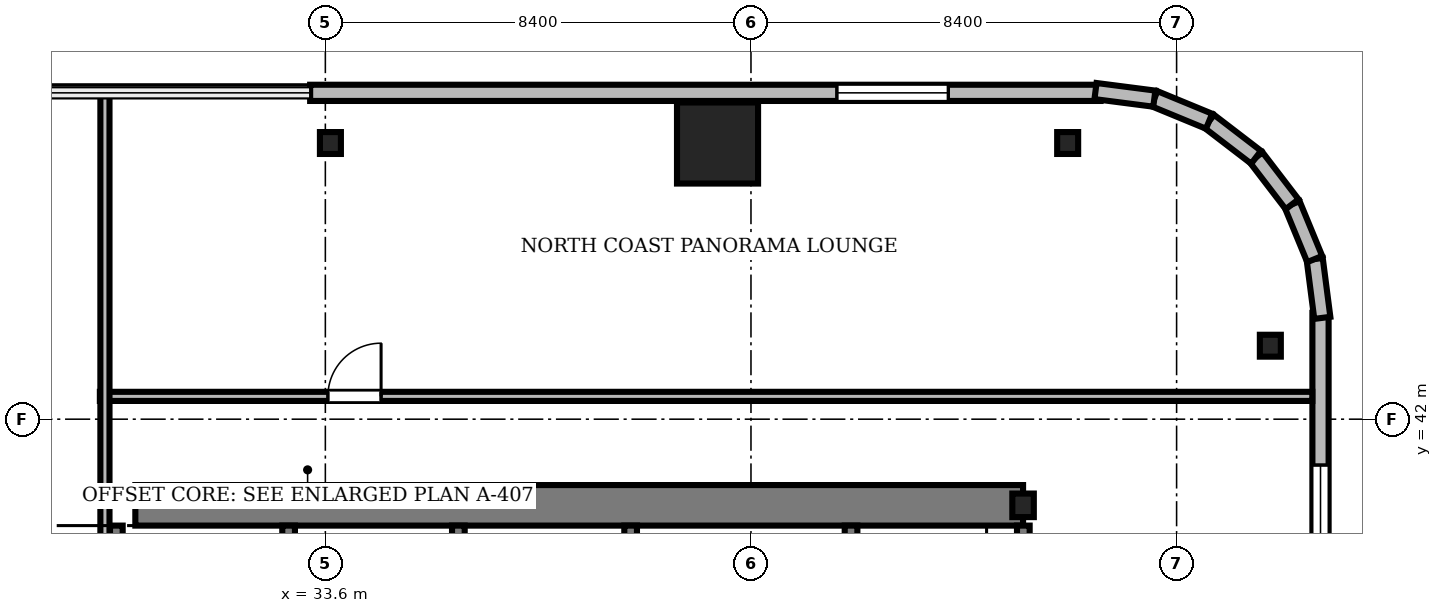
"""IFC4 building model, lengths in metres.
Left out: names, types, materials, properties, quantities, classifications, styles, units other than length and angle.
Written with IfcOpenShell. Run it as: python <this file> out.ifc"""

import sys

from ifc_helpers import new_model, si_unit, direction, frame, frame_2d, origin, origin_2d, place, context, subcontext, project, spatial, rectangle, i_section, extrude, source, transform, mapped, element, fill, save


model = new_model("IFC4")
c1 = context("Model", 3, precision=1e-05, world=origin(), true_north=direction((0.0, 1.0)))
c2 = subcontext(c1, "Body", "Model", "MODEL_VIEW")
j1 = project(units=[si_unit("LENGTHUNIT", "METRE"), si_unit("PLANEANGLEUNIT", "RADIAN")], contexts=[c1])
p1 = place(None, origin())
s1 = spatial("IfcSite", under=j1, at=p1, CompositionType="ELEMENT")
p2 = place(p1, origin())
s2 = spatial("IfcBuilding", under=s1, at=p2, CompositionType="ELEMENT")
p3 = place(p2, frame((0.0, 0.0, 152.0)))
s3 = spatial("IfcBuildingStorey", under=s2, at=p3, CompositionType="ELEMENT", Elevation=152.0)
m1 = source(origin(), c2, "Body", "SweptSolid", [
    extrude(rectangle(XDim=17.52, YDim=0.8, at=frame_2d((8.76, 0.0))), origin(), (0.0, 0.0, 1.0), 3.46),
])
p4 = place(p3, frame((29.85, 40.3, 0.0), z_axis=(0.0, 0.0, 1.0), x_axis=(1.0, 0.0, 0.0)))
e1 = element("IfcWall", 1, at=p4, inside=s3, PredefinedType="SHEAR", context=c2, shape_type="MappedRepresentation", body=[
    mapped(m1, transform((0.0, 0.0, 0.0), scale=1.0)),
])
m2 = source(origin(), c2, "Body", "SweptSolid", [
    extrude(i_section(OverallWidth=0.424, OverallDepth=0.465, WebThickness=0.035, FlangeThickness=0.056, FilletRadius=0.015, at=origin_2d()), origin(), (0.0, 0.0, 1.0), 3.46),
])
p5 = place(p3, frame((47.37, 40.3, 0.0), z_axis=(0.0, 0.0, 1.0), x_axis=(1.0, 0.0, 0.0)))
e2 = element("IfcColumn", 2, at=p5, inside=s3, PredefinedType="COLUMN", context=c2, shape_type="MappedRepresentation", body=[
    mapped(m2, transform((0.0, 0.0, 0.0), scale=1.0)),
])
m3 = source(origin(), c2, "Body", "SweptSolid", [
    extrude(rectangle(XDim=1.6, YDim=1.6, at=origin_2d()), origin(), (0.0, 0.0, 1.0), 3.46),
])
p6 = place(p3, frame((41.34, 47.45, 0.0), z_axis=(0.0, 0.0, 1.0), x_axis=(1.0, 0.0, 0.0)))
e3 = element("IfcColumn", 3, at=p6, inside=s3, PredefinedType="COLUMN", context=c2, shape_type="MappedRepresentation", body=[
    mapped(m3, transform((0.0, 0.0, 0.0), scale=1.0)),
])
m4 = source(origin(), c2, "Body", "SweptSolid", [
    extrude(i_section(OverallWidth=0.414, OverallDepth=0.432, WebThickness=0.026, FlangeThickness=0.04, FilletRadius=0.015, at=origin_2d()), origin(), (0.0, 0.0, 1.0), 3.46),
])
for number, where, z_axis, x_axis in (
    (4, (52.25, 43.45, 0.0), (0.0, 0.0, 1.0), (1.0, 0.0, 0.0)),
    (5, (48.25, 47.45, 0.0), (0.0, 0.0, 1.0), (1.0, 0.0, 0.0)),
    (6, (33.7, 47.45, 0.0), (0.0, 0.0, 1.0), (1.0, 0.0, 0.0)),
):
    element("IfcColumn", number, at=place(p3, frame(where, z_axis=z_axis, x_axis=x_axis)), inside=s3, PredefinedType="COLUMN", context=c2, shape_type="MappedRepresentation", body=[
        mapped(m4, transform((0.0, 0.0, 0.0), scale=1.0)),
    ])
m5 = source(origin(), c2, "Body", "SweptSolid", [
    extrude(rectangle(XDim=15.6, YDim=0.32, at=frame_2d((7.8, 0.0))), origin(), (0.0, 0.0, 1.0), 3.46),
])
p7 = place(p3, frame((48.9, 48.44, 0.0), z_axis=(0.0, 0.0, 1.0), x_axis=(-1.0, 0.0, 0.0)))
e7 = element("IfcWall", 7, at=p7, inside=s3, PredefinedType="SOLIDWALL", context=c2, shape_type="MappedRepresentation", body=[
    mapped(m5, transform((0.0, 0.0, 0.0), scale=1.0)),
])
m6 = source(origin(), c2, "Body", "SweptSolid", [
    extrude(rectangle(XDim=2.2, YDim=2.4, at=frame_2d((1.1, 1.2))), frame((0.0, 0.17, 0.0), z_axis=(0.0, -1.0, 0.0), x_axis=(1.0, 0.0, 0.0)), (0.0, 0.0, 1.0), 0.34),
])
p8 = place(p7, frame((3.005, 0.0, 0.72)))
e8 = element("IfcOpeningElement", 8, at=p8, cuts=e7, PredefinedType="OPENING", context=c2, shape_type="MappedRepresentation", body=[
    mapped(m6, transform((0.0, 0.0, 0.0), scale=1.0)),
])
m7 = source(origin(), c2, "Body", "SweptSolid", [
    extrude(rectangle(XDim=15.6, YDim=0.32, at=frame_2d((7.8, 0.0))), origin(), (0.0, 0.0, 1.0), 3.46),
])
p9 = place(p3, frame((53.24, 28.5, 0.0), z_axis=(0.0, 0.0, 1.0), x_axis=(0.0, 1.0, 0.0)))
e9 = element("IfcWall", 9, at=p9, inside=s3, PredefinedType="SOLIDWALL", context=c2, shape_type="MappedRepresentation", body=[
    mapped(m7, transform((0.0, 0.0, 0.0), scale=1.0)),
])
p10 = place(p9, frame((10.395, 0.0, 0.72)))
e10 = element("IfcOpeningElement", 10, at=p10, cuts=e9, PredefinedType="OPENING", context=c2, shape_type="MappedRepresentation", body=[
    mapped(m6, transform((0.0, 0.0, 0.0), scale=1.0)),
])
m8 = source(origin(), c2, "Body", "SweptSolid", [
    extrude(rectangle(XDim=1.17, YDim=0.32, at=frame_2d((0.585, 0.0))), origin(), (0.0, 0.0, 1.0), 3.46),
])
p11 = place(p3, frame((53.276, 44.0, 0.0), z_axis=(0.0, 0.0, 1.0), x_axis=(-0.128295670475, 0.991735963317, 0.0)))
e11 = element("IfcWall", 11, at=p11, inside=s3, PredefinedType="SOLIDWALL", context=c2, shape_type="MappedRepresentation", body=[
    mapped(m8, transform((0.0, 0.0, 0.0), scale=1.0)),
])
m9 = source(origin(), c2, "Body", "SweptSolid", [
    extrude(rectangle(XDim=1.169, YDim=0.32, at=frame_2d((0.584, 0.0))), origin(), (0.0, 0.0, 1.0), 3.46),
])
p12 = place(p3, frame((53.125, 45.16, 0.0), z_axis=(0.0, 0.0, 1.0), x_axis=(-0.381054331552, 0.924552646638, 0.0)))
e12 = element("IfcWall", 12, at=p12, inside=s3, PredefinedType="SOLIDWALL", context=c2, shape_type="MappedRepresentation", body=[
    mapped(m9, transform((0.0, 0.0, 0.0), scale=1.0)),
])
m10 = source(origin(), c2, "Body", "SweptSolid", [
    extrude(rectangle(XDim=1.169, YDim=0.32, at=frame_2d((0.584, 0.0))), origin(), (0.0, 0.0, 1.0), 3.46),
])
p13 = place(p3, frame((52.68, 46.241, 0.0), z_axis=(0.0, 0.0, 1.0), x_axis=(-0.608387696831, 0.793639975269, 0.0)))
e13 = element("IfcWall", 13, at=p13, inside=s3, PredefinedType="SOLIDWALL", context=c2, shape_type="MappedRepresentation", body=[
    mapped(m10, transform((0.0, 0.0, 0.0), scale=1.0)),
])
m11 = source(origin(), c2, "Body", "SweptSolid", [
    extrude(rectangle(XDim=1.169, YDim=0.32, at=frame_2d((0.584, 0.0))), origin(), (0.0, 0.0, 1.0), 3.46),
])
p14 = place(p3, frame((51.969, 47.169, 0.0), z_axis=(0.0, 0.0, 1.0), x_axis=(-0.793663520347, 0.608356981114, 0.0)))
e14 = element("IfcWall", 14, at=p14, inside=s3, PredefinedType="SOLIDWALL", context=c2, shape_type="MappedRepresentation", body=[
    mapped(m11, transform((0.0, 0.0, 0.0), scale=1.0)),
])
p15 = place(p3, frame((51.041, 47.88, 0.0), z_axis=(0.0, 0.0, 1.0), x_axis=(-0.924552646638, 0.381054331552, 0.0)))
e15 = element("IfcWall", 15, at=p15, inside=s3, PredefinedType="SOLIDWALL", context=c2, shape_type="MappedRepresentation", body=[
    mapped(m9, transform((0.0, 0.0, 0.0), scale=1.0)),
])
p16 = place(p3, frame((49.96, 48.325, 0.0), z_axis=(0.0, 0.0, 1.0), x_axis=(-0.991735963317, 0.128295670475, 0.0)))
e16 = element("IfcWall", 16, at=p16, inside=s3, PredefinedType="SOLIDWALL", context=c2, shape_type="MappedRepresentation", body=[
    mapped(m8, transform((0.0, 0.0, 0.0), scale=1.0)),
])
m12 = source(origin(), c2, "Body", "SweptSolid", [
    extrude(rectangle(XDim=9.25, YDim=0.25, at=frame_2d((4.625, 0.0))), origin(), (0.0, 0.0, 1.0), 3.5),
])
for number, where, z_axis, x_axis in (
    (17, (29.475, 30.65, 0.0), (0.0, 0.0, 1.0), (0.0, 1.0, 0.0)),
    (18, (32.875, 30.65, 0.0), (0.0, 0.0, 1.0), (0.0, 1.0, 0.0)),
    (19, (36.225, 30.65, 0.0), (0.0, 0.0, 1.0), (0.0, 1.0, 0.0)),
    (20, (39.625, 30.65, 0.0), (0.0, 0.0, 1.0), (0.0, 1.0, 0.0)),
    (21, (43.975, 30.65, 0.0), (0.0, 0.0, 1.0), (0.0, 1.0, 0.0)),
    (22, (47.375, 30.65, 0.0), (0.0, 0.0, 1.0), (0.0, 1.0, 0.0)),
):
    element("IfcWall", number, at=place(p3, frame(where, z_axis=z_axis, x_axis=x_axis)), inside=s3, PredefinedType="SOLIDWALL", context=c2, shape_type="MappedRepresentation", body=[
        mapped(m12, transform((0.0, 0.0, 0.0), scale=1.0)),
    ])
m13 = source(origin(), c2, "Body", "SweptSolid", [
    extrude(rectangle(XDim=23.928, YDim=0.18, at=frame_2d((11.964, 0.0))), origin(), (0.0, 0.0, 1.0), 2.702),
])
p17 = place(p3, frame((29.15, 42.45, 0.0), z_axis=(0.0, 0.0, 1.0), x_axis=(1.0, 0.0, 0.0)))
e23 = element("IfcWall", 23, at=p17, inside=s3, PredefinedType="PARTITIONING", context=c2, shape_type="MappedRepresentation", body=[
    mapped(m13, transform((0.0, 0.0, 0.0), scale=1.0)),
])
m14 = source(origin(), c2, "Body", "SweptSolid", [
    extrude(rectangle(XDim=1.05, YDim=2.2, at=frame_2d((0.525, 1.1))), frame((0.0, 0.1, 0.0), z_axis=(0.0, -1.0, 0.0), x_axis=(1.0, 0.0, 0.0)), (0.0, 0.0, 1.0), 0.2),
])
p18 = place(p17, frame((4.5, 0.0, 0.0)))
e24 = element("IfcOpeningElement", 24, at=p18, cuts=e23, PredefinedType="OPENING", context=c2, shape_type="MappedRepresentation", body=[
    mapped(m14, transform((0.0, 0.0, 0.0), scale=1.0)),
])
m15 = source(origin(), c2, "Body", "SweptSolid", [
    extrude(rectangle(XDim=11.45, YDim=0.18, at=frame_2d((5.725, 0.0))), origin(), (0.0, 0.0, 1.0), 2.702),
])
p19 = place(p3, frame((29.25, 37.02, 0.0), z_axis=(0.0, 0.0, 1.0), x_axis=(0.0, 1.0, 0.0)))
e25 = element("IfcWall", 25, at=p19, inside=s3, PredefinedType="PARTITIONING", context=c2, shape_type="MappedRepresentation", body=[
    mapped(m15, transform((0.0, 0.0, 0.0), scale=1.0)),
])
m16 = source(origin(), c2, "Body", "SweptSolid", [
    extrude(rectangle(XDim=2.2, YDim=2.4, at=frame_2d((1.1, 1.2))), frame((0.0, 0.03, 0.0), z_axis=(0.0, -1.0, 0.0), x_axis=(1.0, 0.0, 0.0)), (0.0, 0.0, 1.0), 0.06),
])
p20 = place(p8, origin())
e26 = element("IfcWindow", 26, at=p20, inside=s3, PartitioningType="SINGLE_PANEL", PredefinedType="WINDOW", context=c2, shape_type="MappedRepresentation", body=[
    mapped(m16, transform((0.0, 0.0, 0.0), scale=1.0)),
])
fill(e8, e26)
p21 = place(p10, origin())
e27 = element("IfcWindow", 27, at=p21, inside=s3, PartitioningType="SINGLE_PANEL", PredefinedType="WINDOW", context=c2, shape_type="MappedRepresentation", body=[
    mapped(m16, transform((0.0, 0.0, 0.0), scale=1.0)),
])
fill(e10, e27)
m17 = source(origin(), c2, "Body", "SweptSolid", [
    extrude(rectangle(XDim=1.05, YDim=2.2, at=frame_2d((0.525, 1.1))), frame((0.0, 0.025, 0.0), z_axis=(0.0, -1.0, 0.0), x_axis=(1.0, 0.0, 0.0)), (0.0, 0.0, 1.0), 0.05),
])
p22 = place(p18, origin())
e28 = element("IfcDoor", 28, at=p22, inside=s3, OperationType="SINGLE_SWING_RIGHT", PredefinedType="DOOR", context=c2, shape_type="MappedRepresentation", body=[
    mapped(m17, transform((0.0, 0.0, 0.0), scale=1.0)),
])
fill(e24, e28)
save(model, sys.argv[1])
